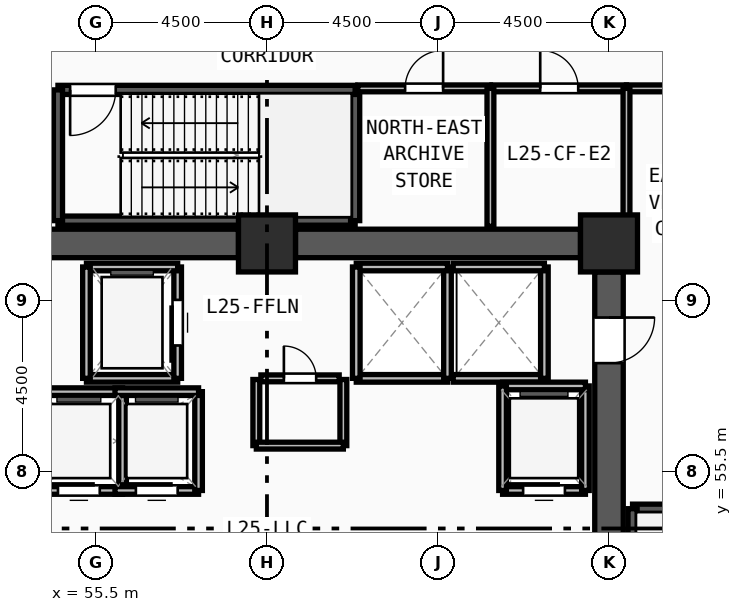
"""IFC4 building model, lengths in metres.
Left out: names, types, materials, properties, quantities, classifications, styles, units other than length and angle.
Written with IfcOpenShell. Run it as: python <this file> out.ifc"""

import sys

from ifc_helpers import new_model, si_unit, direction, frame, frame_2d, origin, origin_2d, place, context, subcontext, project, spatial, rectangle, extrude, source, transform, mapped, element, fill, save


model = new_model("IFC4")
c1 = context("Model", 3, precision=1e-05, world=origin(), true_north=direction((0.0, 1.0)))
c2 = subcontext(c1, "Body", "Model", "MODEL_VIEW")
j1 = project(units=[si_unit("LENGTHUNIT", "METRE"), si_unit("PLANEANGLEUNIT", "RADIAN")], contexts=[c1])
p1 = place(None, origin())
s1 = spatial("IfcSite", under=j1, at=p1, CompositionType="ELEMENT")
p2 = place(p1, origin())
s2 = spatial("IfcBuilding", under=s1, at=p2, CompositionType="ELEMENT")
p3 = place(p2, frame((0.0, 0.0, 97.5)))
s3 = spatial("IfcBuildingStorey", under=s2, at=p3, CompositionType="ELEMENT", Elevation=97.5)
m1 = source(origin(), c2, "Body", "SweptSolid", [
    extrude(rectangle(XDim=1.5, YDim=1.5, at=origin_2d()), origin(), (0.0, 0.0, 1.0), 4.5),
])
for number, where, z_axis, x_axis in (
    (1, (69.0, 61.5, 0.0), (0.0, 0.0, 1.0), (1.0, 0.0, 0.0)),
    (2, (60.0, 61.5, 0.0), (0.0, 0.0, 1.0), (1.0, 0.0, 0.0)),
):
    element("IfcColumn", number, at=place(p3, frame(where, z_axis=z_axis, x_axis=x_axis)), inside=s3, PredefinedType="COLUMN", context=c2, shape_type="MappedRepresentation", body=[
        mapped(m1, transform((0.0, 0.0, 0.0), x_axis=(1.0, 0.0, 0.0), y_axis=(0.0, 1.0, 0.0), z_axis=(0.0, 0.0, 1.0), scale=1.0)),
    ])
for number, where, z_axis, x_axis in (
    (3, (51.75, 61.5, 0.0), (0.0, 0.0, 1.0), (1.0, 0.0, 0.0)),
    (4, (60.75, 61.5, 0.0), (0.0, 0.0, 1.0), (1.0, 0.0, 0.0)),
):
    element("IfcWall", number, at=place(p3, frame(where, z_axis=z_axis, x_axis=x_axis)), inside=s3, PredefinedType="SHEAR", context=c2, shape_type="SweptSolid", body=[
        extrude(rectangle(XDim=7.5, YDim=0.75, at=frame_2d((3.75, 0.0))), origin(), (0.0, 0.0, 1.0), 4.32),
    ])
p4 = place(p3, frame((69.0, 60.75, 0.0), z_axis=(0.0, 0.0, 1.0), x_axis=(0.0, -1.0, 0.0)))
e5 = element("IfcWall", 5, at=p4, inside=s3, PredefinedType="SHEAR", context=c2, shape_type="SweptSolid", body=[
    extrude(rectangle(XDim=13.5, YDim=0.75, at=frame_2d((6.75, 0.0))), origin(), (0.0, 0.0, 1.0), 4.32),
])
m2 = source(origin(), c2, "Body", "SweptSolid", [
    extrude(rectangle(XDim=1.2, YDim=2.2, at=frame_2d((0.6, 1.1))), frame((0.0, 0.385, 0.0), z_axis=(0.0, -1.0, 0.0), x_axis=(1.0, 0.0, 0.0)), (0.0, 0.0, 1.0), 0.77),
])
p5 = place(p4, frame((1.2, 0.0, 0.0)))
e6 = element("IfcOpeningElement", 6, at=p5, cuts=e5, PredefinedType="OPENING", context=c2, shape_type="MappedRepresentation", body=[
    mapped(m2, transform((0.0, 0.0, 0.0), x_axis=(1.0, 0.0, 0.0), y_axis=(0.0, 1.0, 0.0), z_axis=(0.0, 0.0, 1.0), scale=1.0)),
])
p6 = place(p3, frame((73.06, 54.52, 0.0), z_axis=(0.0, 0.0, 1.0), x_axis=(-1.0, 0.0, 0.0)))
e7 = element("IfcWall", 7, at=p6, inside=s3, PredefinedType="SOLIDWALL", context=c2, shape_type="SweptSolid", body=[
    extrude(rectangle(XDim=3.44, YDim=0.24, at=frame_2d((1.72, 0.0))), origin(), (0.0, 0.0, 1.0), 4.32),
])
for number, where, z_axis, x_axis in (
    (8, (69.62, 54.52, 0.0), (0.0, 0.0, 1.0), (0.0, -1.0, 0.0)),
    (9, (54.5, 62.1, 0.0), (0.0, 0.0, 1.0), (1.0, 0.0, 0.0)),
):
    element("IfcWall", number, at=place(p3, frame(where, z_axis=z_axis, x_axis=x_axis)), inside=s3, PredefinedType="SOLIDWALL", context=c2, shape_type="SweptSolid", body=[
        extrude(rectangle(XDim=7.82, YDim=0.24, at=frame_2d((3.91, 0.0))), origin(), (0.0, 0.0, 1.0), 4.32),
    ])
p7 = place(p3, frame((62.32, 62.1, 0.0), z_axis=(0.0, 0.0, 1.0), x_axis=(0.0, 1.0, 0.0)))
e10 = element("IfcWall", 10, at=p7, inside=s3, PredefinedType="SOLIDWALL", context=c2, shape_type="SweptSolid", body=[
    extrude(rectangle(XDim=3.44, YDim=0.24, at=frame_2d((1.72, 0.0))), origin(), (0.0, 0.0, 1.0), 4.32),
])
p8 = place(p3, frame((62.32, 65.54, 0.0), z_axis=(0.0, 0.0, 1.0), x_axis=(-1.0, 0.0, 0.0)))
e11 = element("IfcWall", 11, at=p8, inside=s3, PredefinedType="SOLIDWALL", context=c2, shape_type="SweptSolid", body=[
    extrude(rectangle(XDim=7.82, YDim=0.24, at=frame_2d((3.91, 0.0))), origin(), (0.0, 0.0, 1.0), 4.32),
])
m3 = source(origin(), c2, "Body", "SweptSolid", [
    extrude(rectangle(XDim=1.2, YDim=2.2, at=frame_2d((0.6, 1.1))), frame((0.0, 0.13, 0.0), z_axis=(0.0, -1.0, 0.0), x_axis=(1.0, 0.0, 0.0)), (0.0, 0.0, 1.0), 0.26),
])
p9 = place(p8, frame((6.3, 0.0, 0.0)))
e12 = element("IfcOpeningElement", 12, at=p9, cuts=e11, PredefinedType="OPENING", context=c2, shape_type="MappedRepresentation", body=[
    mapped(m3, transform((0.0, 0.0, 0.0), x_axis=(1.0, 0.0, 0.0), y_axis=(0.0, 1.0, 0.0), z_axis=(0.0, 0.0, 1.0), scale=1.0)),
])
p10 = place(p3, frame((54.5, 65.54, 0.0), z_axis=(0.0, 0.0, 1.0), x_axis=(0.0, -1.0, 0.0)))
e13 = element("IfcWall", 13, at=p10, inside=s3, PredefinedType="SOLIDWALL", context=c2, shape_type="SweptSolid", body=[
    extrude(rectangle(XDim=3.44, YDim=0.24, at=frame_2d((1.72, 0.0))), origin(), (0.0, 0.0, 1.0), 4.32),
])
p11 = place(p3, frame((55.25, 57.95, 0.0), z_axis=(0.0, 0.0, 1.0), x_axis=(1.0, 0.0, 0.0)))
e14 = element("IfcWall", 14, at=p11, inside=s3, PredefinedType="SOLIDWALL", context=c2, shape_type="SweptSolid", body=[
    extrude(rectangle(XDim=2.4, YDim=0.2, at=frame_2d((1.2, 0.0))), origin(), (0.0, 0.0, 1.0), 4.32),
])
p12 = place(p3, frame((57.65, 57.95, 0.0), z_axis=(0.0, 0.0, 1.0), x_axis=(0.0, 1.0, 0.0)))
e15 = element("IfcWall", 15, at=p12, inside=s3, PredefinedType="SOLIDWALL", context=c2, shape_type="SweptSolid", body=[
    extrude(rectangle(XDim=2.93, YDim=0.2, at=frame_2d((1.465, 0.0))), origin(), (0.0, 0.0, 1.0), 4.32),
])
m4 = source(origin(), c2, "Body", "SweptSolid", [
    extrude(rectangle(XDim=1.2, YDim=2.3, at=frame_2d((0.6, 1.15))), frame((0.0, 0.11, 0.0), z_axis=(0.0, -1.0, 0.0), x_axis=(1.0, 0.0, 0.0)), (0.0, 0.0, 1.0), 0.22),
])
p13 = place(p12, frame((0.865, 0.0, 0.0)))
e16 = element("IfcOpeningElement", 16, at=p13, cuts=e15, PredefinedType="OPENING", context=c2, shape_type="MappedRepresentation", body=[
    mapped(m4, transform((0.0, 0.0, 0.0), x_axis=(1.0, 0.0, 0.0), y_axis=(0.0, 1.0, 0.0), z_axis=(0.0, 0.0, 1.0), scale=1.0)),
])
p14 = place(p3, frame((57.65, 60.88, 0.0), z_axis=(0.0, 0.0, 1.0), x_axis=(-1.0, 0.0, 0.0)))
e17 = element("IfcWall", 17, at=p14, inside=s3, PredefinedType="SOLIDWALL", context=c2, shape_type="SweptSolid", body=[
    extrude(rectangle(XDim=2.4, YDim=0.2, at=frame_2d((1.2, 0.0))), origin(), (0.0, 0.0, 1.0), 4.32),
])
p15 = place(p3, frame((55.25, 60.88, 0.0), z_axis=(0.0, 0.0, 1.0), x_axis=(0.0, -1.0, 0.0)))
e18 = element("IfcWall", 18, at=p15, inside=s3, PredefinedType="SOLIDWALL", context=c2, shape_type="SweptSolid", body=[
    extrude(rectangle(XDim=2.93, YDim=0.2, at=frame_2d((1.465, 0.0))), origin(), (0.0, 0.0, 1.0), 4.32),
])
p16 = place(p3, frame((62.35, 57.95, 0.0), z_axis=(0.0, 0.0, 1.0), x_axis=(1.0, 0.0, 0.0)))
e19 = element("IfcWall", 19, at=p16, inside=s3, PredefinedType="SOLIDWALL", context=c2, shape_type="SweptSolid", body=[
    extrude(rectangle(XDim=2.4, YDim=0.2, at=frame_2d((1.2, 0.0))), origin(), (0.0, 0.0, 1.0), 4.32),
])
p17 = place(p3, frame((64.75, 57.95, 0.0), z_axis=(0.0, 0.0, 1.0), x_axis=(0.0, 1.0, 0.0)))
e20 = element("IfcWall", 20, at=p17, inside=s3, PredefinedType="SOLIDWALL", context=c2, shape_type="SweptSolid", body=[
    extrude(rectangle(XDim=2.93, YDim=0.2, at=frame_2d((1.465, 0.0))), origin(), (0.0, 0.0, 1.0), 4.32),
])
p18 = place(p3, frame((64.75, 60.88, 0.0), z_axis=(0.0, 0.0, 1.0), x_axis=(-1.0, 0.0, 0.0)))
e21 = element("IfcWall", 21, at=p18, inside=s3, PredefinedType="SOLIDWALL", context=c2, shape_type="SweptSolid", body=[
    extrude(rectangle(XDim=2.4, YDim=0.2, at=frame_2d((1.2, 0.0))), origin(), (0.0, 0.0, 1.0), 4.32),
])
p19 = place(p3, frame((62.35, 60.88, 0.0), z_axis=(0.0, 0.0, 1.0), x_axis=(0.0, -1.0, 0.0)))
e22 = element("IfcWall", 22, at=p19, inside=s3, PredefinedType="SOLIDWALL", context=c2, shape_type="SweptSolid", body=[
    extrude(rectangle(XDim=2.93, YDim=0.2, at=frame_2d((1.465, 0.0))), origin(), (0.0, 0.0, 1.0), 4.32),
])
p20 = place(p3, frame((64.9, 57.95, 0.0), z_axis=(0.0, 0.0, 1.0), x_axis=(1.0, 0.0, 0.0)))
e23 = element("IfcWall", 23, at=p20, inside=s3, PredefinedType="SOLIDWALL", context=c2, shape_type="SweptSolid", body=[
    extrude(rectangle(XDim=2.4, YDim=0.2, at=frame_2d((1.2, 0.0))), origin(), (0.0, 0.0, 1.0), 4.32),
])
p21 = place(p3, frame((67.3, 57.95, 0.0), z_axis=(0.0, 0.0, 1.0), x_axis=(0.0, 1.0, 0.0)))
e24 = element("IfcWall", 24, at=p21, inside=s3, PredefinedType="SOLIDWALL", context=c2, shape_type="SweptSolid", body=[
    extrude(rectangle(XDim=2.93, YDim=0.2, at=frame_2d((1.465, 0.0))), origin(), (0.0, 0.0, 1.0), 4.32),
])
p22 = place(p3, frame((67.3, 60.88, 0.0), z_axis=(0.0, 0.0, 1.0), x_axis=(-1.0, 0.0, 0.0)))
e25 = element("IfcWall", 25, at=p22, inside=s3, PredefinedType="SOLIDWALL", context=c2, shape_type="SweptSolid", body=[
    extrude(rectangle(XDim=2.4, YDim=0.2, at=frame_2d((1.2, 0.0))), origin(), (0.0, 0.0, 1.0), 4.32),
])
p23 = place(p3, frame((66.2, 55.0, 0.0), z_axis=(0.0, 0.0, 1.0), x_axis=(1.0, 0.0, 0.0)))
e26 = element("IfcWall", 26, at=p23, inside=s3, PredefinedType="SOLIDWALL", context=c2, shape_type="SweptSolid", body=[
    extrude(rectangle(XDim=2.18, YDim=0.2, at=frame_2d((1.09, 0.0))), origin(), (0.0, 0.0, 1.0), 4.32),
])
m5 = source(origin(), c2, "Body", "SweptSolid", [
    extrude(rectangle(XDim=1.1, YDim=2.2, at=frame_2d((0.55, 1.1))), frame((0.0, 0.11, 0.0), z_axis=(0.0, -1.0, 0.0), x_axis=(1.0, 0.0, 0.0)), (0.0, 0.0, 1.0), 0.22),
])
p24 = place(p23, frame((0.54, 0.0, 0.0)))
e27 = element("IfcOpeningElement", 27, at=p24, cuts=e26, PredefinedType="OPENING", context=c2, shape_type="MappedRepresentation", body=[
    mapped(m5, transform((0.0, 0.0, 0.0), x_axis=(1.0, 0.0, 0.0), y_axis=(0.0, 1.0, 0.0), z_axis=(0.0, 0.0, 1.0), scale=1.0)),
])
p25 = place(p3, frame((68.38, 55.0, 0.0), z_axis=(0.0, 0.0, 1.0), x_axis=(0.0, 1.0, 0.0)))
e28 = element("IfcWall", 28, at=p25, inside=s3, PredefinedType="SOLIDWALL", context=c2, shape_type="SweptSolid", body=[
    extrude(rectangle(XDim=2.75, YDim=0.2, at=frame_2d((1.375, 0.0))), origin(), (0.0, 0.0, 1.0), 4.32),
])
p26 = place(p3, frame((68.38, 57.75, 0.0), z_axis=(0.0, 0.0, 1.0), x_axis=(-1.0, 0.0, 0.0)))
e29 = element("IfcWall", 29, at=p26, inside=s3, PredefinedType="SOLIDWALL", context=c2, shape_type="SweptSolid", body=[
    extrude(rectangle(XDim=2.18, YDim=0.2, at=frame_2d((1.09, 0.0))), origin(), (0.0, 0.0, 1.0), 4.32),
])
p27 = place(p3, frame((66.2, 57.75, 0.0), z_axis=(0.0, 0.0, 1.0), x_axis=(0.0, -1.0, 0.0)))
e30 = element("IfcWall", 30, at=p27, inside=s3, PredefinedType="SOLIDWALL", context=c2, shape_type="SweptSolid", body=[
    extrude(rectangle(XDim=2.75, YDim=0.2, at=frame_2d((1.375, 0.0))), origin(), (0.0, 0.0, 1.0), 4.32),
])
p28 = place(p3, frame((53.9, 55.0, 0.0), z_axis=(0.0, 0.0, 1.0), x_axis=(1.0, 0.0, 0.0)))
e31 = element("IfcWall", 31, at=p28, inside=s3, PredefinedType="SOLIDWALL", context=c2, shape_type="SweptSolid", body=[
    extrude(rectangle(XDim=2.3, YDim=0.2, at=frame_2d((1.15, 0.0))), origin(), (0.0, 0.0, 1.0), 4.32),
])
p29 = place(p28, frame((0.6, 0.0, 0.0)))
e32 = element("IfcOpeningElement", 32, at=p29, cuts=e31, PredefinedType="OPENING", context=c2, shape_type="MappedRepresentation", body=[
    mapped(m5, transform((0.0, 0.0, 0.0), x_axis=(1.0, 0.0, 0.0), y_axis=(0.0, 1.0, 0.0), z_axis=(0.0, 0.0, 1.0), scale=1.0)),
])
p30 = place(p3, frame((56.2, 55.0, 0.0), z_axis=(0.0, 0.0, 1.0), x_axis=(0.0, 1.0, 0.0)))
e33 = element("IfcWall", 33, at=p30, inside=s3, PredefinedType="SOLIDWALL", context=c2, shape_type="SweptSolid", body=[
    extrude(rectangle(XDim=2.6, YDim=0.2, at=frame_2d((1.3, 0.0))), origin(), (0.0, 0.0, 1.0), 4.32),
])
p31 = place(p3, frame((56.2, 57.6, 0.0), z_axis=(0.0, 0.0, 1.0), x_axis=(-1.0, 0.0, 0.0)))
e34 = element("IfcWall", 34, at=p31, inside=s3, PredefinedType="SOLIDWALL", context=c2, shape_type="SweptSolid", body=[
    extrude(rectangle(XDim=2.3, YDim=0.2, at=frame_2d((1.15, 0.0))), origin(), (0.0, 0.0, 1.0), 4.32),
])
p32 = place(p3, frame((56.0, 55.0, 0.0), z_axis=(0.0, 0.0, 1.0), x_axis=(1.0, 0.0, 0.0)))
e35 = element("IfcWall", 35, at=p32, inside=s3, PredefinedType="SOLIDWALL", context=c2, shape_type="SweptSolid", body=[
    extrude(rectangle(XDim=2.2, YDim=0.2, at=frame_2d((1.1, 0.0))), origin(), (0.0, 0.0, 1.0), 4.32),
])
p33 = place(p32, frame((0.55, 0.0, 0.0)))
e36 = element("IfcOpeningElement", 36, at=p33, cuts=e35, PredefinedType="OPENING", context=c2, shape_type="MappedRepresentation", body=[
    mapped(m5, transform((0.0, 0.0, 0.0), x_axis=(1.0, 0.0, 0.0), y_axis=(0.0, 1.0, 0.0), z_axis=(0.0, 0.0, 1.0), scale=1.0)),
])
p34 = place(p3, frame((58.2, 55.0, 0.0), z_axis=(0.0, 0.0, 1.0), x_axis=(0.0, 1.0, 0.0)))
e37 = element("IfcWall", 37, at=p34, inside=s3, PredefinedType="SOLIDWALL", context=c2, shape_type="SweptSolid", body=[
    extrude(rectangle(XDim=2.6, YDim=0.2, at=frame_2d((1.3, 0.0))), origin(), (0.0, 0.0, 1.0), 4.32),
])
p35 = place(p3, frame((58.2, 57.6, 0.0), z_axis=(0.0, 0.0, 1.0), x_axis=(-1.0, 0.0, 0.0)))
e38 = element("IfcWall", 38, at=p35, inside=s3, PredefinedType="SOLIDWALL", context=c2, shape_type="SweptSolid", body=[
    extrude(rectangle(XDim=2.2, YDim=0.2, at=frame_2d((1.1, 0.0))), origin(), (0.0, 0.0, 1.0), 4.32),
])
p36 = place(p3, frame((59.84, 57.95, 0.0), z_axis=(0.0, 0.0, 1.0), x_axis=(1.0, 0.0, 0.0)))
e39 = element("IfcWall", 39, at=p36, inside=s3, PredefinedType="PARTITIONING", context=c2, shape_type="SweptSolid", body=[
    extrude(rectangle(XDim=2.06, YDim=0.18, at=frame_2d((1.03, 0.0))), origin(), (0.0, 0.0, 1.0), 4.32),
])
m6 = source(origin(), c2, "Body", "SweptSolid", [
    extrude(rectangle(XDim=0.85, YDim=2.1, at=frame_2d((0.425, 1.05))), frame((0.0, 0.1, 0.0), z_axis=(0.0, -1.0, 0.0), x_axis=(1.0, 0.0, 0.0)), (0.0, 0.0, 1.0), 0.2),
])
p37 = place(p36, frame((0.605, 0.0, 0.0)))
e40 = element("IfcOpeningElement", 40, at=p37, cuts=e39, PredefinedType="OPENING", context=c2, shape_type="MappedRepresentation", body=[
    mapped(m6, transform((0.0, 0.0, 0.0), x_axis=(1.0, 0.0, 0.0), y_axis=(0.0, 1.0, 0.0), z_axis=(0.0, 0.0, 1.0), scale=1.0)),
])
p38 = place(p3, frame((62.39, 65.58, 0.0), z_axis=(0.0, 0.0, 1.0), x_axis=(1.0, 0.0, 0.0)))
e41 = element("IfcWall", 41, at=p38, inside=s3, PredefinedType="PARTITIONING", context=c2, shape_type="SweptSolid", body=[
    extrude(rectangle(XDim=3.49, YDim=0.18, at=frame_2d((1.745, 0.0))), origin(), (0.0, 0.0, 1.0), 4.32),
])
m7 = source(origin(), c2, "Body", "SweptSolid", [
    extrude(rectangle(XDim=1.0, YDim=2.2, at=frame_2d((0.5, 1.1))), frame((0.0, 0.1, 0.0), z_axis=(0.0, -1.0, 0.0), x_axis=(1.0, 0.0, 0.0)), (0.0, 0.0, 1.0), 0.2),
])
p39 = place(p38, frame((1.245, 0.0, 0.0)))
e42 = element("IfcOpeningElement", 42, at=p39, cuts=e41, PredefinedType="OPENING", context=c2, shape_type="MappedRepresentation", body=[
    mapped(m7, transform((0.0, 0.0, 0.0), x_axis=(1.0, 0.0, 0.0), y_axis=(0.0, 1.0, 0.0), z_axis=(0.0, 0.0, 1.0), scale=1.0)),
])
p40 = place(p3, frame((65.92, 65.58, 0.0), z_axis=(0.0, 0.0, 1.0), x_axis=(1.0, 0.0, 0.0)))
e43 = element("IfcWall", 43, at=p40, inside=s3, PredefinedType="PARTITIONING", context=c2, shape_type="SweptSolid", body=[
    extrude(rectangle(XDim=3.54, YDim=0.18, at=frame_2d((1.77, 0.0))), origin(), (0.0, 0.0, 1.0), 4.32),
])
p41 = place(p40, frame((1.27, 0.0, 0.0)))
e44 = element("IfcOpeningElement", 44, at=p41, cuts=e43, PredefinedType="OPENING", context=c2, shape_type="MappedRepresentation", body=[
    mapped(m7, transform((0.0, 0.0, 0.0), x_axis=(1.0, 0.0, 0.0), y_axis=(0.0, 1.0, 0.0), z_axis=(0.0, 0.0, 1.0), scale=1.0)),
])
p42 = place(p3, frame((69.46, 65.58, 0.0), z_axis=(0.0, 0.0, 1.0), x_axis=(1.0, 0.0, 0.0)))
e45 = element("IfcWall", 45, at=p42, inside=s3, PredefinedType="PARTITIONING", context=c2, shape_type="SweptSolid", body=[
    extrude(rectangle(XDim=3.84, YDim=0.18, at=frame_2d((1.92, 0.0))), origin(), (0.0, 0.0, 1.0), 4.32),
])
m8 = source(origin(), c2, "Body", "SweptSolid", [
    extrude(rectangle(XDim=1.3, YDim=2.2, at=frame_2d((0.65, 1.1))), frame((0.0, 0.1, 0.0), z_axis=(0.0, -1.0, 0.0), x_axis=(1.0, 0.0, 0.0)), (0.0, 0.0, 1.0), 0.2),
])
p43 = place(p42, frame((1.27, 0.0, 0.0)))
e46 = element("IfcOpeningElement", 46, at=p43, cuts=e45, PredefinedType="OPENING", context=c2, shape_type="MappedRepresentation", body=[
    mapped(m8, transform((0.0, 0.0, 0.0), x_axis=(1.0, 0.0, 0.0), y_axis=(0.0, 1.0, 0.0), z_axis=(0.0, 0.0, 1.0), scale=1.0)),
])
for number, where, z_axis, x_axis in (
    (47, (59.72, 56.18, 0.0), (0.0, 0.0, 1.0), (0.0, 1.0, 0.0)),
    (48, (62.01, 56.18, 0.0), (0.0, 0.0, 1.0), (0.0, 1.0, 0.0)),
):
    element("IfcWall", number, at=place(p3, frame(where, z_axis=z_axis, x_axis=x_axis)), inside=s3, PredefinedType="PARTITIONING", context=c2, shape_type="SweptSolid", body=[
        extrude(rectangle(XDim=1.74, YDim=0.18, at=frame_2d((0.87, 0.0))), origin(), (0.0, 0.0, 1.0), 4.32),
    ])
p44 = place(p3, frame((59.72, 56.18, 0.0), z_axis=(0.0, 0.0, 1.0), x_axis=(1.0, 0.0, 0.0)))
e49 = element("IfcWall", 49, at=p44, inside=s3, PredefinedType="PARTITIONING", context=c2, shape_type="SweptSolid", body=[
    extrude(rectangle(XDim=2.29, YDim=0.18, at=frame_2d((1.145, 0.0))), origin(), (0.0, 0.0, 1.0), 4.32),
])
for number, where, z_axis, x_axis in (
    (50, (65.88, 61.95, 0.0), (0.0, 0.0, 1.0), (0.0, 1.0, 0.0)),
    (51, (69.46, 61.95, 0.0), (0.0, 0.0, 1.0), (0.0, 1.0, 0.0)),
):
    element("IfcWall", number, at=place(p3, frame(where, z_axis=z_axis, x_axis=x_axis)), inside=s3, PredefinedType="PARTITIONING", context=c2, shape_type="SweptSolid", body=[
        extrude(rectangle(XDim=3.63, YDim=0.18, at=frame_2d((1.815, 0.0))), origin(), (0.0, 0.0, 1.0), 4.32),
    ])
m9 = source(origin(), c2, "Body", "SweptSolid", [
    extrude(rectangle(XDim=1.2, YDim=2.2, at=frame_2d((0.6, 1.1))), frame((0.0, 0.025, 0.0), z_axis=(0.0, -1.0, 0.0), x_axis=(1.0, 0.0, 0.0)), (0.0, 0.0, 1.0), 0.05),
])
p45 = place(p5, origin())
e52 = element("IfcDoor", 52, at=p45, inside=s3, OperationType="SINGLE_SWING_LEFT", PredefinedType="DOOR", context=c2, shape_type="MappedRepresentation", body=[
    mapped(m9, transform((0.0, 0.0, 0.0), x_axis=(1.0, 0.0, 0.0), y_axis=(0.0, 1.0, 0.0), z_axis=(0.0, 0.0, 1.0), scale=1.0)),
])
fill(e6, e52)
p46 = place(p9, origin())
e53 = element("IfcDoor", 53, at=p46, inside=s3, OperationType="SINGLE_SWING_RIGHT", PredefinedType="DOOR", context=c2, shape_type="MappedRepresentation", body=[
    mapped(m9, transform((0.0, 0.0, 0.0), x_axis=(1.0, 0.0, 0.0), y_axis=(0.0, 1.0, 0.0), z_axis=(0.0, 0.0, 1.0), scale=1.0)),
])
fill(e12, e53)
m10 = source(origin(), c2, "Body", "SweptSolid", [
    extrude(rectangle(XDim=1.2, YDim=2.3, at=frame_2d((0.6, 1.15))), frame((0.0, 0.025, 0.0), z_axis=(0.0, -1.0, 0.0), x_axis=(1.0, 0.0, 0.0)), (0.0, 0.0, 1.0), 0.05),
])
p47 = place(p13, origin())
e54 = element("IfcDoor", 54, at=p47, inside=s3, OperationType="SLIDING_TO_LEFT", PredefinedType="DOOR", context=c2, shape_type="MappedRepresentation", body=[
    mapped(m10, transform((0.0, 0.0, 0.0), x_axis=(1.0, 0.0, 0.0), y_axis=(0.0, 1.0, 0.0), z_axis=(0.0, 0.0, 1.0), scale=1.0)),
])
fill(e16, e54)
m11 = source(origin(), c2, "Body", "SweptSolid", [
    extrude(rectangle(XDim=1.1, YDim=2.2, at=frame_2d((0.55, 1.1))), frame((0.0, 0.025, 0.0), z_axis=(0.0, -1.0, 0.0), x_axis=(1.0, 0.0, 0.0)), (0.0, 0.0, 1.0), 0.05),
])
p48 = place(p24, origin())
e55 = element("IfcDoor", 55, at=p48, inside=s3, OperationType="SLIDING_TO_LEFT", PredefinedType="DOOR", context=c2, shape_type="MappedRepresentation", body=[
    mapped(m11, transform((0.0, 0.0, 0.0), x_axis=(1.0, 0.0, 0.0), y_axis=(0.0, 1.0, 0.0), z_axis=(0.0, 0.0, 1.0), scale=1.0)),
])
fill(e27, e55)
p49 = place(p29, origin())
e56 = element("IfcDoor", 56, at=p49, inside=s3, OperationType="SLIDING_TO_LEFT", PredefinedType="DOOR", context=c2, shape_type="MappedRepresentation", body=[
    mapped(m11, transform((0.0, 0.0, 0.0), x_axis=(1.0, 0.0, 0.0), y_axis=(0.0, 1.0, 0.0), z_axis=(0.0, 0.0, 1.0), scale=1.0)),
])
fill(e32, e56)
p50 = place(p33, origin())
e57 = element("IfcDoor", 57, at=p50, inside=s3, OperationType="SLIDING_TO_LEFT", PredefinedType="DOOR", context=c2, shape_type="MappedRepresentation", body=[
    mapped(m11, transform((0.0, 0.0, 0.0), x_axis=(1.0, 0.0, 0.0), y_axis=(0.0, 1.0, 0.0), z_axis=(0.0, 0.0, 1.0), scale=1.0)),
])
fill(e36, e57)
m12 = source(origin(), c2, "Body", "SweptSolid", [
    extrude(rectangle(XDim=0.85, YDim=2.1, at=frame_2d((0.425, 1.05))), frame((0.0, 0.025, 0.0), z_axis=(0.0, -1.0, 0.0), x_axis=(1.0, 0.0, 0.0)), (0.0, 0.0, 1.0), 0.05),
])
p51 = place(p37, origin())
e58 = element("IfcDoor", 58, at=p51, inside=s3, OperationType="SINGLE_SWING_LEFT", PredefinedType="DOOR", context=c2, shape_type="MappedRepresentation", body=[
    mapped(m12, transform((0.0, 0.0, 0.0), x_axis=(1.0, 0.0, 0.0), y_axis=(0.0, 1.0, 0.0), z_axis=(0.0, 0.0, 1.0), scale=1.0)),
])
fill(e40, e58)
m13 = source(origin(), c2, "Body", "SweptSolid", [
    extrude(rectangle(XDim=1.0, YDim=2.2, at=frame_2d((0.5, 1.1))), frame((0.0, 0.025, 0.0), z_axis=(0.0, -1.0, 0.0), x_axis=(1.0, 0.0, 0.0)), (0.0, 0.0, 1.0), 0.05),
])
p52 = place(p39, origin())
e59 = element("IfcDoor", 59, at=p52, inside=s3, OperationType="SINGLE_SWING_RIGHT", PredefinedType="DOOR", context=c2, shape_type="MappedRepresentation", body=[
    mapped(m13, transform((0.0, 0.0, 0.0), x_axis=(1.0, 0.0, 0.0), y_axis=(0.0, 1.0, 0.0), z_axis=(0.0, 0.0, 1.0), scale=1.0)),
])
fill(e42, e59)
p53 = place(p41, origin())
e60 = element("IfcDoor", 60, at=p53, inside=s3, OperationType="SINGLE_SWING_LEFT", PredefinedType="DOOR", context=c2, shape_type="MappedRepresentation", body=[
    mapped(m13, transform((0.0, 0.0, 0.0), x_axis=(1.0, 0.0, 0.0), y_axis=(0.0, 1.0, 0.0), z_axis=(0.0, 0.0, 1.0), scale=1.0)),
])
fill(e44, e60)
save(model, sys.argv[1])
